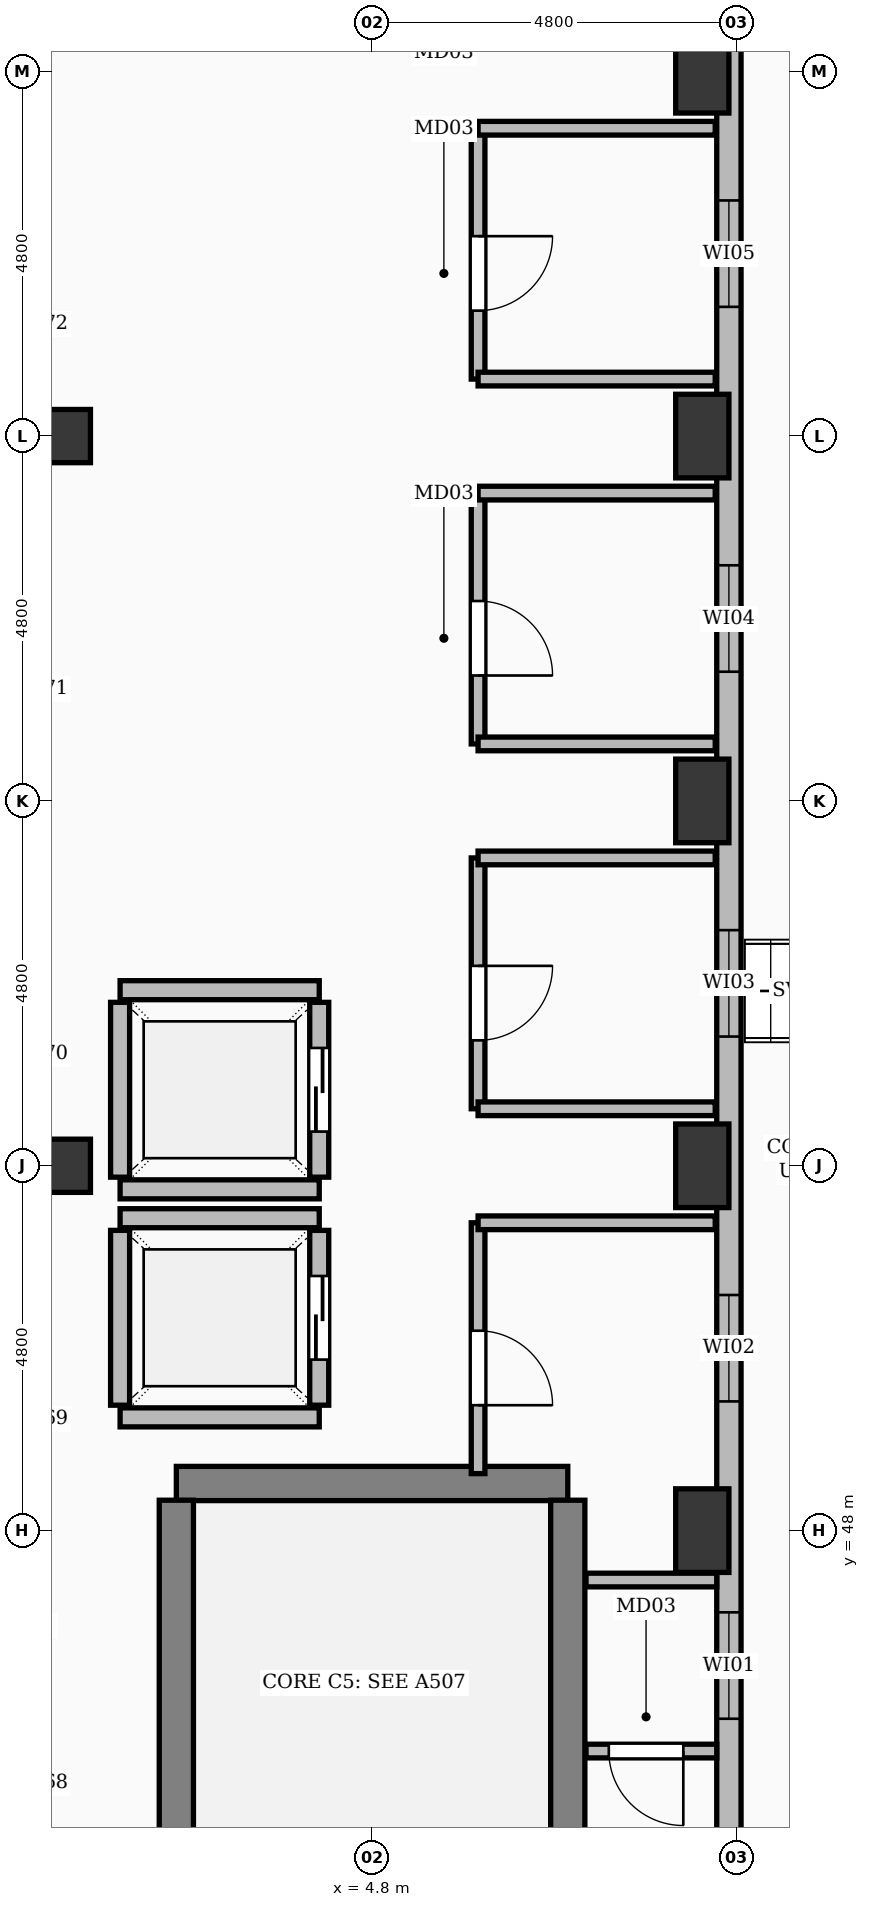
"""IFC4 building model, lengths in metres.
Left out: names, types, materials, properties, quantities, classifications, styles, units other than length and angle.
Written with IfcOpenShell. Run it as: python <this file> out.ifc"""

import sys

from ifc_helpers import new_model, si_unit, direction, frame, frame_2d, origin, origin_2d, place, context, subcontext, project, spatial, rectangle, extrude, element, fill, save


model = new_model("IFC4")
c1 = context("Model", 3, precision=1e-05, world=origin(), true_north=direction((0.0, 1.0)))
c2 = subcontext(c1, "Body", "Model", "MODEL_VIEW")
j1 = project(units=[si_unit("LENGTHUNIT", "METRE"), si_unit("PLANEANGLEUNIT", "RADIAN")], contexts=[c1])
p1 = place(None, origin())
s1 = spatial("IfcSite", under=j1, at=p1, CompositionType="ELEMENT")
p2 = place(p1, origin())
s2 = spatial("IfcBuilding", under=s1, at=p2, CompositionType="ELEMENT")
p3 = place(p2, frame((0.0, 0.0, 11.4)))
s3 = spatial("IfcBuildingStorey", under=s2, at=p3, CompositionType="ELEMENT", Elevation=11.4)
for number, where, z_axis, x_axis in (
    (1, (0.75, 52.8, 0.0), (0.0, 0.0, 1.0), (1.0, 0.0, 0.0)),
    (2, (0.75, 62.4, 0.0), (0.0, 0.0, 1.0), (1.0, 0.0, 0.0)),
):
    element("IfcColumn", number, at=place(p3, frame(where, z_axis=z_axis, x_axis=x_axis)), inside=s3, PredefinedType="COLUMN", context=c2, shape_type="SweptSolid", body=[
        extrude(rectangle(XDim=0.7, YDim=0.7, at=origin_2d()), origin(), (0.0, 0.0, 1.0), 4.8),
    ])
for number, where, z_axis, x_axis in (
    (3, (9.15, 48.0, 0.0), (0.0, 0.0, 1.0), (1.0, 0.0, 0.0)),
    (4, (9.15, 52.8, 0.0), (0.0, 0.0, 1.0), (1.0, 0.0, 0.0)),
    (5, (9.15, 57.6, 0.0), (0.0, 0.0, 1.0), (1.0, 0.0, 0.0)),
    (6, (9.15, 62.4, 0.0), (0.0, 0.0, 1.0), (1.0, 0.0, 0.0)),
    (7, (9.15, 67.2, 0.0), (0.0, 0.0, 1.0), (1.0, 0.0, 0.0)),
):
    element("IfcColumn", number, at=place(p3, frame(where, z_axis=z_axis, x_axis=x_axis)), inside=s3, PredefinedType="COLUMN", context=c2, shape_type="SweptSolid", body=[
        extrude(rectangle(XDim=0.7, YDim=1.1, at=origin_2d()), origin(), (0.0, 0.0, 1.0), 4.8),
    ])
p4 = place(p3, frame((2.23, 48.62, 0.0), z_axis=(0.0, 0.0, 1.0), x_axis=(1.0, 0.0, 0.0)))
e8 = element("IfcWall", 8, at=p4, inside=s3, PredefinedType="SHEAR", context=c2, shape_type="SweptSolid", body=[
    extrude(rectangle(XDim=5.15, YDim=0.45, at=frame_2d((2.575, 0.0))), origin(), (0.0, 0.0, 1.0), 4.42),
])
p5 = place(p3, frame((2.23, 36.4, 0.0), z_axis=(0.0, 0.0, 1.0), x_axis=(0.0, 1.0, 0.0)))
e9 = element("IfcWall", 9, at=p5, inside=s3, PredefinedType="SHEAR", context=c2, shape_type="SweptSolid", body=[
    extrude(rectangle(XDim=12.0, YDim=0.45, at=frame_2d((6.0, 0.0))), origin(), (0.0, 0.0, 1.0), 4.42),
])
p6 = place(p3, frame((7.38, 36.4, 0.0), z_axis=(0.0, 0.0, 1.0), x_axis=(0.0, 1.0, 0.0)))
e10 = element("IfcWall", 10, at=p6, inside=s3, PredefinedType="SHEAR", context=c2, shape_type="SweptSolid", body=[
    extrude(rectangle(XDim=12.0, YDim=0.45, at=frame_2d((6.0, 0.0))), origin(), (0.0, 0.0, 1.0), 4.42),
])
p7 = place(p6, frame((0.55, 0.0, 0.0)))
e11 = element("IfcOpeningElement", 11, at=p7, cuts=e10, PredefinedType="OPENING", context=c2, shape_type="SweptSolid", body=[
    extrude(rectangle(XDim=2.1, YDim=2.2, at=frame_2d((1.05, 1.1))), frame((0.0, 0.237, 0.0), z_axis=(0.0, -1.0, 0.0), x_axis=(1.0, 0.0, 0.0)), (0.0, 0.0, 1.0), 0.474),
])
for number, where, z_axis, x_axis in (
    (12, (1.49, 49.49, 0.0), (0.0, 0.0, 1.0), (1.0, 0.0, 0.0)),
    (13, (1.49, 52.11, 0.0), (0.0, 0.0, 1.0), (1.0, 0.0, 0.0)),
):
    element("IfcWall", number, at=place(p3, frame(where, z_axis=z_axis, x_axis=x_axis)), inside=s3, PredefinedType="SOLIDWALL", context=c2, shape_type="SweptSolid", body=[
        extrude(rectangle(XDim=2.62, YDim=0.25, at=frame_2d((1.31, 0.0))), origin(), (0.0, 0.0, 1.0), 4.42),
    ])
p8 = place(p3, frame((1.49, 49.65, 0.0), z_axis=(0.0, 0.0, 1.0), x_axis=(0.0, 1.0, 0.0)))
e14 = element("IfcWall", 14, at=p8, inside=s3, PredefinedType="SOLIDWALL", context=c2, shape_type="SweptSolid", body=[
    extrude(rectangle(XDim=2.3, YDim=0.25, at=frame_2d((1.15, 0.0))), origin(), (0.0, 0.0, 1.0), 4.42),
])
p9 = place(p3, frame((4.11, 49.65, 0.0), z_axis=(0.0, 0.0, 1.0), x_axis=(0.0, 1.0, 0.0)))
e15 = element("IfcWall", 15, at=p9, inside=s3, PredefinedType="SOLIDWALL", context=c2, shape_type="SweptSolid", body=[
    extrude(rectangle(XDim=2.3, YDim=0.25, at=frame_2d((1.15, 0.0))), origin(), (0.0, 0.0, 1.0), 4.42),
])
p10 = place(p9, frame((0.6, 0.0, 0.0)))
e16 = element("IfcOpeningElement", 16, at=p10, cuts=e15, PredefinedType="OPENING", context=c2, shape_type="SweptSolid", body=[
    extrude(rectangle(XDim=1.1, YDim=2.2, at=frame_2d((0.55, 1.1))), frame((0.0, 0.137, 0.0), z_axis=(0.0, -1.0, 0.0), x_axis=(1.0, 0.0, 0.0)), (0.0, 0.0, 1.0), 0.274),
])
p11 = place(p3, frame((1.49, 52.49, 0.0), z_axis=(0.0, 0.0, 1.0), x_axis=(1.0, 0.0, 0.0)))
e17 = element("IfcWall", 17, at=p11, inside=s3, PredefinedType="SOLIDWALL", context=c2, shape_type="SweptSolid", body=[
    extrude(rectangle(XDim=2.62, YDim=0.25, at=frame_2d((1.31, 0.0))), origin(), (0.0, 0.0, 1.0), 3.692),
])
p12 = place(p3, frame((1.49, 55.11, 0.0), z_axis=(0.0, 0.0, 1.0), x_axis=(1.0, 0.0, 0.0)))
e18 = element("IfcWall", 18, at=p12, inside=s3, PredefinedType="SOLIDWALL", context=c2, shape_type="SweptSolid", body=[
    extrude(rectangle(XDim=2.62, YDim=0.25, at=frame_2d((1.31, 0.0))), origin(), (0.0, 0.0, 1.0), 4.42),
])
p13 = place(p3, frame((1.49, 52.65, 0.0), z_axis=(0.0, 0.0, 1.0), x_axis=(0.0, 1.0, 0.0)))
e19 = element("IfcWall", 19, at=p13, inside=s3, PredefinedType="SOLIDWALL", context=c2, shape_type="SweptSolid", body=[
    extrude(rectangle(XDim=2.3, YDim=0.25, at=frame_2d((1.15, 0.0))), origin(), (0.0, 0.0, 1.0), 3.692),
])
p14 = place(p3, frame((4.11, 52.65, 0.0), z_axis=(0.0, 0.0, 1.0), x_axis=(0.0, 1.0, 0.0)))
e20 = element("IfcWall", 20, at=p14, inside=s3, PredefinedType="SOLIDWALL", context=c2, shape_type="SweptSolid", body=[
    extrude(rectangle(XDim=2.3, YDim=0.25, at=frame_2d((1.15, 0.0))), origin(), (0.0, 0.0, 1.0), 3.692),
])
p15 = place(p14, frame((0.6, 0.0, 0.0)))
e21 = element("IfcOpeningElement", 21, at=p15, cuts=e20, PredefinedType="OPENING", context=c2, shape_type="SweptSolid", body=[
    extrude(rectangle(XDim=1.1, YDim=2.2, at=frame_2d((0.55, 1.1))), frame((0.0, 0.137, 0.0), z_axis=(0.0, -1.0, 0.0), x_axis=(1.0, 0.0, 0.0)), (0.0, 0.0, 1.0), 0.274),
])
p16 = place(p3, frame((9.5, 34.2, 0.0), z_axis=(0.0, 0.0, 1.0), x_axis=(0.0, 1.0, 0.0)))
e22 = element("IfcWall", 22, at=p16, inside=s3, PredefinedType="SOLIDWALL", context=c2, shape_type="SweptSolid", body=[
    extrude(rectangle(XDim=51.6, YDim=0.32, at=frame_2d((25.8, 0.0))), origin(), (0.0, 0.0, 1.0), 3.692),
])
p17 = place(p16, frame((0.8, 0.0, 0.0)))
e23 = element("IfcOpeningElement", 23, at=p17, cuts=e22, PredefinedType="OPENING", context=c2, shape_type="SweptSolid", body=[
    extrude(rectangle(XDim=2.4, YDim=2.5, at=frame_2d((1.2, 1.25))), frame((0.0, 0.172, 0.0), z_axis=(0.0, -1.0, 0.0), x_axis=(1.0, 0.0, 0.0)), (0.0, 0.0, 1.0), 0.344),
])
p18 = place(p16, frame((11.325, 0.0, 0.95)))
e24 = element("IfcOpeningElement", 24, at=p18, cuts=e22, PredefinedType="OPENING", context=c2, shape_type="SweptSolid", body=[
    extrude(rectangle(XDim=1.4, YDim=1.1, at=frame_2d((0.7, 0.55))), frame((0.0, 0.172, 0.0), z_axis=(0.0, -1.0, 0.0), x_axis=(1.0, 0.0, 0.0)), (0.0, 0.0, 1.0), 0.344),
])
p19 = place(p16, frame((15.5, 0.0, 0.95)))
e25 = element("IfcOpeningElement", 25, at=p19, cuts=e22, PredefinedType="OPENING", context=c2, shape_type="SweptSolid", body=[
    extrude(rectangle(XDim=1.4, YDim=1.1, at=frame_2d((0.7, 0.55))), frame((0.0, 0.172, 0.0), z_axis=(0.0, -1.0, 0.0), x_axis=(1.0, 0.0, 0.0)), (0.0, 0.0, 1.0), 0.344),
])
p20 = place(p16, frame((20.3, 0.0, 0.95)))
e26 = element("IfcOpeningElement", 26, at=p20, cuts=e22, PredefinedType="OPENING", context=c2, shape_type="SweptSolid", body=[
    extrude(rectangle(XDim=1.4, YDim=1.1, at=frame_2d((0.7, 0.55))), frame((0.0, 0.172, 0.0), z_axis=(0.0, -1.0, 0.0), x_axis=(1.0, 0.0, 0.0)), (0.0, 0.0, 1.0), 0.344),
])
p21 = place(p16, frame((25.1, 0.0, 0.95)))
e27 = element("IfcOpeningElement", 27, at=p21, cuts=e22, PredefinedType="OPENING", context=c2, shape_type="SweptSolid", body=[
    extrude(rectangle(XDim=1.4, YDim=1.1, at=frame_2d((0.7, 0.55))), frame((0.0, 0.172, 0.0), z_axis=(0.0, -1.0, 0.0), x_axis=(1.0, 0.0, 0.0)), (0.0, 0.0, 1.0), 0.344),
])
p22 = place(p16, frame((29.9, 0.0, 0.95)))
e28 = element("IfcOpeningElement", 28, at=p22, cuts=e22, PredefinedType="OPENING", context=c2, shape_type="SweptSolid", body=[
    extrude(rectangle(XDim=1.4, YDim=1.1, at=frame_2d((0.7, 0.55))), frame((0.0, 0.172, 0.0), z_axis=(0.0, -1.0, 0.0), x_axis=(1.0, 0.0, 0.0)), (0.0, 0.0, 1.0), 0.344),
])
p23 = place(p16, frame((34.7, 0.0, 0.95)))
e29 = element("IfcOpeningElement", 29, at=p23, cuts=e22, PredefinedType="OPENING", context=c2, shape_type="SweptSolid", body=[
    extrude(rectangle(XDim=1.4, YDim=1.2, at=frame_2d((0.7, 0.6))), frame((0.0, 0.172, 0.0), z_axis=(0.0, -1.0, 0.0), x_axis=(1.0, 0.0, 0.0)), (0.0, 0.0, 1.0), 0.344),
])
p24 = place(p3, frame((7.62, 45.1, 0.0), z_axis=(0.0, 0.0, 1.0), x_axis=(1.0, 0.0, 0.0)))
e30 = element("IfcWall", 30, at=p24, inside=s3, PredefinedType="PARTITIONING", context=c2, shape_type="SweptSolid", body=[
    extrude(rectangle(XDim=1.72, YDim=0.18, at=frame_2d((0.86, 0.0))), origin(), (0.0, 0.0, 1.0), 3.692),
])
p25 = place(p24, frame((0.3, 0.0, 0.0)))
e31 = element("IfcOpeningElement", 31, at=p25, cuts=e30, PredefinedType="OPENING", context=c2, shape_type="SweptSolid", body=[
    extrude(rectangle(XDim=0.98, YDim=2.15, at=frame_2d((0.49, 1.075))), frame((0.0, 0.102, 0.0), z_axis=(0.0, -1.0, 0.0), x_axis=(1.0, 0.0, 0.0)), (0.0, 0.0, 1.0), 0.204),
])
p26 = place(p3, frame((7.62, 47.35, 0.0), z_axis=(0.0, 0.0, 1.0), x_axis=(1.0, 0.0, 0.0)))
e32 = element("IfcWall", 32, at=p26, inside=s3, PredefinedType="PARTITIONING", context=c2, shape_type="SweptSolid", body=[
    extrude(rectangle(XDim=1.72, YDim=0.18, at=frame_2d((0.86, 0.0))), origin(), (0.0, 0.0, 1.0), 3.692),
])
p27 = place(p3, frame((6.2, 48.75, 0.0), z_axis=(0.0, 0.0, 1.0), x_axis=(0.0, 1.0, 0.0)))
e33 = element("IfcWall", 33, at=p27, inside=s3, PredefinedType="PARTITIONING", context=c2, shape_type="SweptSolid", body=[
    extrude(rectangle(XDim=3.3, YDim=0.18, at=frame_2d((1.65, 0.0))), origin(), (0.0, 0.0, 1.0), 4.42),
])
p28 = place(p27, frame((0.9, 0.0, 0.0)))
e34 = element("IfcOpeningElement", 34, at=p28, cuts=e33, PredefinedType="OPENING", context=c2, shape_type="SweptSolid", body=[
    extrude(rectangle(XDim=0.98, YDim=2.15, at=frame_2d((0.49, 1.075))), frame((0.0, 0.102, 0.0), z_axis=(0.0, -1.0, 0.0), x_axis=(1.0, 0.0, 0.0)), (0.0, 0.0, 1.0), 0.204),
])
p29 = place(p3, frame((6.2, 52.05, 0.0), z_axis=(0.0, 0.0, 1.0), x_axis=(1.0, 0.0, 0.0)))
e35 = element("IfcWall", 35, at=p29, inside=s3, PredefinedType="PARTITIONING", context=c2, shape_type="SweptSolid", body=[
    extrude(rectangle(XDim=3.12, YDim=0.18, at=frame_2d((1.56, 0.0))), origin(), (0.0, 0.0, 1.0), 3.692),
])
p30 = place(p3, frame((6.2, 53.55, 0.0), z_axis=(0.0, 0.0, 1.0), x_axis=(0.0, 1.0, 0.0)))
e36 = element("IfcWall", 36, at=p30, inside=s3, PredefinedType="PARTITIONING", context=c2, shape_type="SweptSolid", body=[
    extrude(rectangle(XDim=3.3, YDim=0.18, at=frame_2d((1.65, 0.0))), origin(), (0.0, 0.0, 1.0), 4.42),
])
p31 = place(p30, frame((0.9, 0.0, 0.0)))
e37 = element("IfcOpeningElement", 37, at=p31, cuts=e36, PredefinedType="OPENING", context=c2, shape_type="SweptSolid", body=[
    extrude(rectangle(XDim=0.98, YDim=2.15, at=frame_2d((0.49, 1.075))), frame((0.0, 0.102, 0.0), z_axis=(0.0, -1.0, 0.0), x_axis=(1.0, 0.0, 0.0)), (0.0, 0.0, 1.0), 0.204),
])
for number, where, z_axis, x_axis in (
    (38, (6.2, 53.55, 0.0), (0.0, 0.0, 1.0), (1.0, 0.0, 0.0)),
    (39, (6.2, 56.85, 0.0), (0.0, 0.0, 1.0), (1.0, 0.0, 0.0)),
):
    element("IfcWall", number, at=place(p3, frame(where, z_axis=z_axis, x_axis=x_axis)), inside=s3, PredefinedType="PARTITIONING", context=c2, shape_type="SweptSolid", body=[
        extrude(rectangle(XDim=3.12, YDim=0.18, at=frame_2d((1.56, 0.0))), origin(), (0.0, 0.0, 1.0), 3.692),
    ])
p32 = place(p3, frame((6.2, 58.35, 0.0), z_axis=(0.0, 0.0, 1.0), x_axis=(0.0, 1.0, 0.0)))
e40 = element("IfcWall", 40, at=p32, inside=s3, PredefinedType="PARTITIONING", context=c2, shape_type="SweptSolid", body=[
    extrude(rectangle(XDim=3.3, YDim=0.18, at=frame_2d((1.65, 0.0))), origin(), (0.0, 0.0, 1.0), 4.42),
])
p33 = place(p32, frame((0.9, 0.0, 0.0)))
e41 = element("IfcOpeningElement", 41, at=p33, cuts=e40, PredefinedType="OPENING", context=c2, shape_type="SweptSolid", body=[
    extrude(rectangle(XDim=0.98, YDim=2.15, at=frame_2d((0.49, 1.075))), frame((0.0, 0.102, 0.0), z_axis=(0.0, -1.0, 0.0), x_axis=(1.0, 0.0, 0.0)), (0.0, 0.0, 1.0), 0.204),
])
for number, where, z_axis, x_axis in (
    (42, (6.2, 58.35, 0.0), (0.0, 0.0, 1.0), (1.0, 0.0, 0.0)),
    (43, (6.2, 61.65, 0.0), (0.0, 0.0, 1.0), (1.0, 0.0, 0.0)),
):
    element("IfcWall", number, at=place(p3, frame(where, z_axis=z_axis, x_axis=x_axis)), inside=s3, PredefinedType="PARTITIONING", context=c2, shape_type="SweptSolid", body=[
        extrude(rectangle(XDim=3.12, YDim=0.18, at=frame_2d((1.56, 0.0))), origin(), (0.0, 0.0, 1.0), 3.692),
    ])
p34 = place(p3, frame((6.2, 63.15, 0.0), z_axis=(0.0, 0.0, 1.0), x_axis=(0.0, 1.0, 0.0)))
e44 = element("IfcWall", 44, at=p34, inside=s3, PredefinedType="PARTITIONING", context=c2, shape_type="SweptSolid", body=[
    extrude(rectangle(XDim=3.3, YDim=0.18, at=frame_2d((1.65, 0.0))), origin(), (0.0, 0.0, 1.0), 4.42),
])
p35 = place(p34, frame((0.9, 0.0, 0.0)))
e45 = element("IfcOpeningElement", 45, at=p35, cuts=e44, PredefinedType="OPENING", context=c2, shape_type="SweptSolid", body=[
    extrude(rectangle(XDim=0.98, YDim=2.15, at=frame_2d((0.49, 1.075))), frame((0.0, 0.102, 0.0), z_axis=(0.0, -1.0, 0.0), x_axis=(1.0, 0.0, 0.0)), (0.0, 0.0, 1.0), 0.204),
])
for number, where, z_axis, x_axis in (
    (46, (6.2, 63.15, 0.0), (0.0, 0.0, 1.0), (1.0, 0.0, 0.0)),
    (47, (6.2, 66.45, 0.0), (0.0, 0.0, 1.0), (1.0, 0.0, 0.0)),
):
    element("IfcWall", number, at=place(p3, frame(where, z_axis=z_axis, x_axis=x_axis)), inside=s3, PredefinedType="PARTITIONING", context=c2, shape_type="SweptSolid", body=[
        extrude(rectangle(XDim=3.12, YDim=0.18, at=frame_2d((1.56, 0.0))), origin(), (0.0, 0.0, 1.0), 3.692),
    ])
p36 = place(p10, origin())
e48 = element("IfcDoor", 48, at=p36, inside=s3, OperationType="SLIDING_TO_LEFT", PredefinedType="DOOR", context=c2, shape_type="SweptSolid", body=[
    extrude(rectangle(XDim=1.1, YDim=2.2, at=frame_2d((0.55, 1.1))), frame((0.0, 0.025, 0.0), z_axis=(0.0, -1.0, 0.0), x_axis=(1.0, 0.0, 0.0)), (0.0, 0.0, 1.0), 0.05),
])
fill(e16, e48)
p37 = place(p15, origin())
e49 = element("IfcDoor", 49, at=p37, inside=s3, OperationType="SLIDING_TO_LEFT", PredefinedType="DOOR", context=c2, shape_type="SweptSolid", body=[
    extrude(rectangle(XDim=1.1, YDim=2.2, at=frame_2d((0.55, 1.1))), frame((0.0, 0.025, 0.0), z_axis=(0.0, -1.0, 0.0), x_axis=(1.0, 0.0, 0.0)), (0.0, 0.0, 1.0), 0.05),
])
fill(e21, e49)
p38 = place(p25, frame((0.98, 0.0, 0.0), z_axis=(0.0, 0.0, 1.0), x_axis=(-1.0, 0.0, 0.0)))
e50 = element("IfcDoor", 50, at=p38, inside=s3, OperationType="SINGLE_SWING_RIGHT", PredefinedType="DOOR", context=c2, shape_type="SweptSolid", body=[
    extrude(rectangle(XDim=0.98, YDim=2.15, at=frame_2d((0.49, 1.075))), frame((0.0, 0.025, 0.0), z_axis=(0.0, -1.0, 0.0), x_axis=(1.0, 0.0, 0.0)), (0.0, 0.0, 1.0), 0.05),
])
fill(e31, e50)
p39 = place(p18, origin())
e51 = element("IfcWindow", 51, at=p39, inside=s3, PartitioningType="SINGLE_PANEL", PredefinedType="WINDOW", context=c2, shape_type="SweptSolid", body=[
    extrude(rectangle(XDim=1.4, YDim=1.1, at=frame_2d((0.7, 0.55))), frame((0.0, 0.03, 0.0), z_axis=(0.0, -1.0, 0.0), x_axis=(1.0, 0.0, 0.0)), (0.0, 0.0, 1.0), 0.06),
])
fill(e24, e51)
p40 = place(p28, frame((0.98, 0.0, 0.0), z_axis=(0.0, 0.0, 1.0), x_axis=(-1.0, 0.0, 0.0)))
e52 = element("IfcDoor", 52, at=p40, inside=s3, OperationType="SINGLE_SWING_LEFT", PredefinedType="DOOR", context=c2, shape_type="SweptSolid", body=[
    extrude(rectangle(XDim=0.98, YDim=2.15, at=frame_2d((0.49, 1.075))), frame((0.0, 0.025, 0.0), z_axis=(0.0, -1.0, 0.0), x_axis=(1.0, 0.0, 0.0)), (0.0, 0.0, 1.0), 0.05),
])
fill(e34, e52)
p41 = place(p19, origin())
e53 = element("IfcWindow", 53, at=p41, inside=s3, PartitioningType="SINGLE_PANEL", PredefinedType="WINDOW", context=c2, shape_type="SweptSolid", body=[
    extrude(rectangle(XDim=1.4, YDim=1.1, at=frame_2d((0.7, 0.55))), frame((0.0, 0.03, 0.0), z_axis=(0.0, -1.0, 0.0), x_axis=(1.0, 0.0, 0.0)), (0.0, 0.0, 1.0), 0.06),
])
fill(e25, e53)
p42 = place(p31, frame((0.98, 0.0, 0.0), z_axis=(0.0, 0.0, 1.0), x_axis=(-1.0, 0.0, 0.0)))
e54 = element("IfcDoor", 54, at=p42, inside=s3, OperationType="SINGLE_SWING_RIGHT", PredefinedType="DOOR", context=c2, shape_type="SweptSolid", body=[
    extrude(rectangle(XDim=0.98, YDim=2.15, at=frame_2d((0.49, 1.075))), frame((0.0, 0.025, 0.0), z_axis=(0.0, -1.0, 0.0), x_axis=(1.0, 0.0, 0.0)), (0.0, 0.0, 1.0), 0.05),
])
fill(e37, e54)
p43 = place(p20, origin())
e55 = element("IfcWindow", 55, at=p43, inside=s3, PartitioningType="SINGLE_PANEL", PredefinedType="WINDOW", context=c2, shape_type="SweptSolid", body=[
    extrude(rectangle(XDim=1.4, YDim=1.1, at=frame_2d((0.7, 0.55))), frame((0.0, 0.03, 0.0), z_axis=(0.0, -1.0, 0.0), x_axis=(1.0, 0.0, 0.0)), (0.0, 0.0, 1.0), 0.06),
])
fill(e26, e55)
p44 = place(p33, frame((0.98, 0.0, 0.0), z_axis=(0.0, 0.0, 1.0), x_axis=(-1.0, 0.0, 0.0)))
e56 = element("IfcDoor", 56, at=p44, inside=s3, OperationType="SINGLE_SWING_LEFT", PredefinedType="DOOR", context=c2, shape_type="SweptSolid", body=[
    extrude(rectangle(XDim=0.98, YDim=2.15, at=frame_2d((0.49, 1.075))), frame((0.0, 0.025, 0.0), z_axis=(0.0, -1.0, 0.0), x_axis=(1.0, 0.0, 0.0)), (0.0, 0.0, 1.0), 0.05),
])
fill(e41, e56)
p45 = place(p21, origin())
e57 = element("IfcWindow", 57, at=p45, inside=s3, PartitioningType="SINGLE_PANEL", PredefinedType="WINDOW", context=c2, shape_type="SweptSolid", body=[
    extrude(rectangle(XDim=1.4, YDim=1.1, at=frame_2d((0.7, 0.55))), frame((0.0, 0.03, 0.0), z_axis=(0.0, -1.0, 0.0), x_axis=(1.0, 0.0, 0.0)), (0.0, 0.0, 1.0), 0.06),
])
fill(e27, e57)
p46 = place(p35, frame((0.98, 0.0, 0.0), z_axis=(0.0, 0.0, 1.0), x_axis=(-1.0, 0.0, 0.0)))
e58 = element("IfcDoor", 58, at=p46, inside=s3, OperationType="SINGLE_SWING_RIGHT", PredefinedType="DOOR", context=c2, shape_type="SweptSolid", body=[
    extrude(rectangle(XDim=0.98, YDim=2.15, at=frame_2d((0.49, 1.075))), frame((0.0, 0.025, 0.0), z_axis=(0.0, -1.0, 0.0), x_axis=(1.0, 0.0, 0.0)), (0.0, 0.0, 1.0), 0.05),
])
fill(e45, e58)
p47 = place(p22, origin())
e59 = element("IfcWindow", 59, at=p47, inside=s3, PartitioningType="SINGLE_PANEL", PredefinedType="WINDOW", context=c2, shape_type="SweptSolid", body=[
    extrude(rectangle(XDim=1.4, YDim=1.1, at=frame_2d((0.7, 0.55))), frame((0.0, 0.03, 0.0), z_axis=(0.0, -1.0, 0.0), x_axis=(1.0, 0.0, 0.0)), (0.0, 0.0, 1.0), 0.06),
])
fill(e28, e59)
save(model, sys.argv[1])
